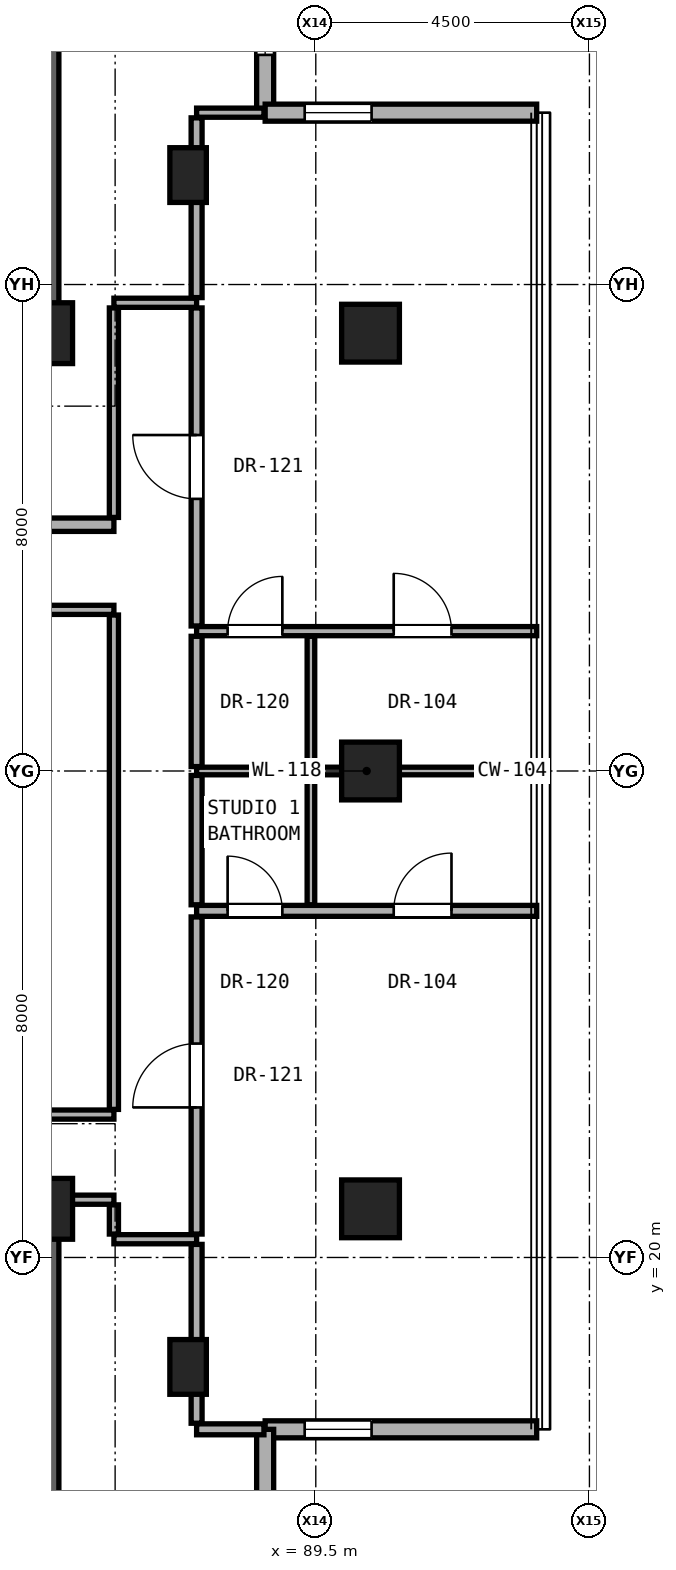
"""IFC4 building model, lengths in metres.
Left out: names, types, materials, properties, quantities, classifications, styles, units other than length and angle.
Written with IfcOpenShell. Run it as: python <this file> out.ifc"""

import sys

from ifc_helpers import new_model, si_unit, direction, frame, frame_2d, origin, origin_2d, place, context, subcontext, project, spatial, rectangle, hollow_rectangle, extrude, element, fill, save


model = new_model("IFC4")
c1 = context("Model", 3, precision=1e-05, world=origin(), true_north=direction((0.0, 1.0)))
c2 = subcontext(c1, "Body", "Model", "MODEL_VIEW")
j1 = project(units=[si_unit("LENGTHUNIT", "METRE"), si_unit("PLANEANGLEUNIT", "RADIAN")], contexts=[c1])
p1 = place(None, origin())
s1 = spatial("IfcSite", under=j1, at=p1, CompositionType="ELEMENT")
p2 = place(p1, origin())
s2 = spatial("IfcBuilding", under=s1, at=p2, CompositionType="ELEMENT")
p3 = place(p2, frame((0.0, 0.0, 154.4)))
s3 = spatial("IfcBuildingStorey", under=s2, at=p3, CompositionType="ELEMENT", Elevation=154.4)
for number, where, z_axis, x_axis in (
    (1, (85.0, 20.8, 0.0), (0.0, 0.0, 1.0), (1.0, 0.0, 0.0)),
    (2, (85.0, 35.2, 0.0), (0.0, 0.0, 1.0), (1.0, 0.0, 0.0)),
):
    element("IfcColumn", number, at=place(p3, frame(where, z_axis=z_axis, x_axis=x_axis)), inside=s3, PredefinedType="COLUMN", context=c2, shape_type="SweptSolid", body=[
        extrude(rectangle(XDim=1.0, YDim=1.0, at=origin_2d()), origin(), (0.0, 0.0, 1.0), 3.25),
    ])
for number, where, z_axis, x_axis in (
    (3, (90.4, 20.8, 0.0), (0.0, 0.0, 1.0), (1.0, 0.0, 0.0)),
    (4, (90.4, 28.0, 0.0), (0.0, 0.0, 1.0), (1.0, 0.0, 0.0)),
    (5, (90.4, 35.2, 0.0), (0.0, 0.0, 1.0), (1.0, 0.0, 0.0)),
):
    element("IfcColumn", number, at=place(p3, frame(where, z_axis=z_axis, x_axis=x_axis)), inside=s3, PredefinedType="COLUMN", context=c2, shape_type="SweptSolid", body=[
        extrude(hollow_rectangle(XDim=0.95, YDim=0.95, WallThickness=0.05, at=origin_2d()), origin(), (0.0, 0.0, 1.0), 3.25),
    ])
for number, where, z_axis, x_axis in (
    (6, (87.4, 18.2, 0.0), (0.0, 0.0, 1.0), (1.0, 0.0, 0.0)),
    (7, (87.4, 37.8, 0.0), (0.0, 0.0, 1.0), (1.0, 0.0, 0.0)),
):
    element("IfcColumn", number, at=place(p3, frame(where, z_axis=z_axis, x_axis=x_axis)), inside=s3, PredefinedType="PILASTER", context=c2, shape_type="SweptSolid", body=[
        extrude(rectangle(XDim=0.6, YDim=0.9, at=origin_2d()), origin(), (0.0, 0.0, 1.0), 3.25),
    ])
for number, where, z_axis, x_axis in (
    (8, (85.0, 35.2, 0.0), (0.0, 0.0, 1.0), (0.0, 1.0, 0.0)),
    (9, (85.0, 15.2, 0.0), (0.0, 0.0, 1.0), (0.0, 1.0, 0.0)),
):
    element("IfcWall", number, at=place(p3, frame(where, z_axis=z_axis, x_axis=x_axis)), inside=s3, PredefinedType="SHEAR", context=c2, shape_type="SweptSolid", body=[
        extrude(rectangle(XDim=5.6, YDim=0.55, at=frame_2d((2.8, 0.0))), origin(), (0.0, 0.0, 1.0), 3.05),
    ])
p4 = place(p3, frame((88.667, 38.826, 0.0), z_axis=(0.0, 0.0, 1.0), x_axis=(0.0, 1.0, 0.0)))
e10 = element("IfcWall", 10, at=p4, inside=s3, PredefinedType="SOLIDWALL", context=c2, shape_type="SweptSolid", body=[
    extrude(rectangle(XDim=4.465, YDim=0.28, at=frame_2d((2.232, 0.0))), origin(), (0.0, 0.0, 1.0), 3.03),
])
p5 = place(p4, frame((0.95, 0.0, 0.85)))
e11 = element("IfcOpeningElement", 11, at=p5, cuts=e10, PredefinedType="OPENING", context=c2, shape_type="SweptSolid", body=[
    extrude(rectangle(XDim=1.1, YDim=2.0, at=frame_2d((0.55, 1.0))), frame((0.0, 0.15, 0.0), z_axis=(0.0, -1.0, 0.0), x_axis=(1.0, 0.0, 0.0)), (0.0, 0.0, 1.0), 0.3),
])
p6 = place(p3, frame((88.667, 17.174, 0.0), z_axis=(0.0, 0.0, 1.0), x_axis=(1.0, 0.0, 0.0)))
e12 = element("IfcWall", 12, at=p6, inside=s3, PredefinedType="SOLIDWALL", context=c2, shape_type="SweptSolid", body=[
    extrude(rectangle(XDim=4.465, YDim=0.28, at=frame_2d((2.233, 0.0))), origin(), (0.0, 0.0, 1.0), 3.03),
])
p7 = place(p6, frame((0.65, 0.0, 0.85)))
e13 = element("IfcOpeningElement", 13, at=p7, cuts=e12, PredefinedType="OPENING", context=c2, shape_type="SweptSolid", body=[
    extrude(rectangle(XDim=1.1, YDim=2.0, at=frame_2d((0.55, 1.0))), frame((0.0, 0.15, 0.0), z_axis=(0.0, -1.0, 0.0), x_axis=(1.0, 0.0, 0.0)), (0.0, 0.0, 1.0), 0.3),
])
p8 = place(p3, frame((88.667, 12.708, 0.0), z_axis=(0.0, 0.0, 1.0), x_axis=(0.0, 1.0, 0.0)))
e14 = element("IfcWall", 14, at=p8, inside=s3, PredefinedType="SOLIDWALL", context=c2, shape_type="SweptSolid", body=[
    extrude(rectangle(XDim=4.465, YDim=0.28, at=frame_2d((2.232, 0.0))), origin(), (0.0, 0.0, 1.0), 3.03),
])
p9 = place(p3, frame((93.133, 38.826, 0.0), z_axis=(0.0, 0.0, 1.0), x_axis=(-1.0, 0.0, 0.0)))
e15 = element("IfcWall", 15, at=p9, inside=s3, PredefinedType="SOLIDWALL", context=c2, shape_type="SweptSolid", body=[
    extrude(rectangle(XDim=4.465, YDim=0.28, at=frame_2d((2.233, 0.0))), origin(), (0.0, 0.0, 1.0), 3.03),
])
p10 = place(p9, frame((2.715, 0.0, 0.85)))
e16 = element("IfcOpeningElement", 16, at=p10, cuts=e15, PredefinedType="OPENING", context=c2, shape_type="SweptSolid", body=[
    extrude(rectangle(XDim=1.1, YDim=2.0, at=frame_2d((0.55, 1.0))), frame((0.0, 0.15, 0.0), z_axis=(0.0, -1.0, 0.0), x_axis=(1.0, 0.0, 0.0)), (0.0, 0.0, 1.0), 0.3),
])
p11 = place(p3, frame((87.54, 17.174, 0.0), z_axis=(0.0, 0.0, 1.0), x_axis=(1.0, 0.0, 0.0)))
e17 = element("IfcWall", 17, at=p11, inside=s3, PredefinedType="PARTITIONING", context=c2, shape_type="SweptSolid", body=[
    extrude(rectangle(XDim=1.107, YDim=0.18, at=frame_2d((0.554, 0.0))), origin(), (0.0, 0.0, 1.0), 3.05),
])
p12 = place(p3, frame((86.18, 20.3, 0.0), z_axis=(0.0, 0.0, 1.0), x_axis=(1.0, 0.0, 0.0)))
e18 = element("IfcWall", 18, at=p12, inside=s3, PredefinedType="PARTITIONING", context=c2, shape_type="SweptSolid", body=[
    extrude(rectangle(XDim=1.36, YDim=0.15, at=frame_2d((0.68, 0.0))), origin(), (0.0, 0.0, 1.0), 3.05),
])
p13 = place(p3, frame((85.27, 20.95, 0.0), z_axis=(0.0, 0.0, 1.0), x_axis=(1.0, 0.0, 0.0)))
e19 = element("IfcWall", 19, at=p13, inside=s3, PredefinedType="PARTITIONING", context=c2, shape_type="SweptSolid", body=[
    extrude(rectangle(XDim=0.91, YDim=0.15, at=frame_2d((0.455, 0.0))), origin(), (0.0, 0.0, 1.0), 2.442),
])
p14 = place(p3, frame((66.68, 22.35, 0.0), z_axis=(0.0, 0.0, 1.0), x_axis=(1.0, 0.0, 0.0)))
e20 = element("IfcWall", 20, at=p14, inside=s3, PredefinedType="PARTITIONING", context=c2, shape_type="SweptSolid", body=[
    extrude(rectangle(XDim=19.5, YDim=0.15, at=frame_2d((9.75, 0.0))), origin(), (0.0, 0.0, 1.0), 2.186),
])
p15 = place(p14, frame((8.053, 0.0, 0.0)))
e21 = element("IfcOpeningElement", 21, at=p15, cuts=e20, PredefinedType="OPENING", context=c2, shape_type="SweptSolid", body=[
    extrude(rectangle(XDim=0.85, YDim=2.01, at=frame_2d((0.425, 1.005))), frame((0.0, 0.085, 0.0), z_axis=(0.0, -1.0, 0.0), x_axis=(1.0, 0.0, 0.0)), (0.0, 0.0, 1.0), 0.17),
])
p16 = place(p3, frame((87.54, 25.7, 0.0), z_axis=(0.0, 0.0, 1.0), x_axis=(1.0, 0.0, 0.0)))
e22 = element("IfcWall", 22, at=p16, inside=s3, PredefinedType="PARTITIONING", context=c2, shape_type="SweptSolid", body=[
    extrude(rectangle(XDim=5.593, YDim=0.18, at=frame_2d((2.796, 0.0))), origin(), (0.0, 0.0, 1.0), 2.269),
])
p17 = place(p16, frame((3.241, 0.0, 0.0)))
e23 = element("IfcOpeningElement", 23, at=p17, cuts=e22, PredefinedType="OPENING", context=c2, shape_type="SweptSolid", body=[
    extrude(rectangle(XDim=0.95, YDim=2.15, at=frame_2d((0.475, 1.075))), frame((0.0, 0.1, 0.0), z_axis=(0.0, -1.0, 0.0), x_axis=(1.0, 0.0, 0.0)), (0.0, 0.0, 1.0), 0.2),
])
p18 = place(p16, frame((0.51, 0.0, 0.0)))
e24 = element("IfcOpeningElement", 24, at=p18, cuts=e22, PredefinedType="OPENING", context=c2, shape_type="SweptSolid", body=[
    extrude(rectangle(XDim=0.9, YDim=2.1, at=frame_2d((0.45, 1.05))), frame((0.0, 0.1, 0.0), z_axis=(0.0, -1.0, 0.0), x_axis=(1.0, 0.0, 0.0)), (0.0, 0.0, 1.0), 0.2),
])
p19 = place(p3, frame((87.54, 28.0, 0.0), z_axis=(0.0, 0.0, 1.0), x_axis=(1.0, 0.0, 0.0)))
e25 = element("IfcWall", 25, at=p19, inside=s3, PredefinedType="PARTITIONING", context=c2, shape_type="SweptSolid", body=[
    extrude(rectangle(XDim=5.593, YDim=0.125, at=frame_2d((2.796, 0.0))), origin(), (0.0, 0.0, 1.0), 2.269),
])
p20 = place(p3, frame((87.54, 30.3, 0.0), z_axis=(0.0, 0.0, 1.0), x_axis=(1.0, 0.0, 0.0)))
e26 = element("IfcWall", 26, at=p20, inside=s3, PredefinedType="PARTITIONING", context=c2, shape_type="SweptSolid", body=[
    extrude(rectangle(XDim=5.593, YDim=0.15, at=frame_2d((2.796, 0.0))), origin(), (0.0, 0.0, 1.0), 2.269),
])
p21 = place(p20, frame((3.241, 0.0, 0.0)))
e27 = element("IfcOpeningElement", 27, at=p21, cuts=e26, PredefinedType="OPENING", context=c2, shape_type="SweptSolid", body=[
    extrude(rectangle(XDim=0.95, YDim=2.15, at=frame_2d((0.475, 1.075))), frame((0.0, 0.085, 0.0), z_axis=(0.0, -1.0, 0.0), x_axis=(1.0, 0.0, 0.0)), (0.0, 0.0, 1.0), 0.17),
])
p22 = place(p20, frame((0.51, 0.0, 0.0)))
e28 = element("IfcOpeningElement", 28, at=p22, cuts=e26, PredefinedType="OPENING", context=c2, shape_type="SweptSolid", body=[
    extrude(rectangle(XDim=0.9, YDim=2.1, at=frame_2d((0.45, 1.05))), frame((0.0, 0.085, 0.0), z_axis=(0.0, -1.0, 0.0), x_axis=(1.0, 0.0, 0.0)), (0.0, 0.0, 1.0), 0.17),
])
p23 = place(p3, frame((66.68, 30.65, 0.0), z_axis=(0.0, 0.0, 1.0), x_axis=(1.0, 0.0, 0.0)))
e29 = element("IfcWall", 29, at=p23, inside=s3, PredefinedType="PARTITIONING", context=c2, shape_type="SweptSolid", body=[
    extrude(rectangle(XDim=19.5, YDim=0.15, at=frame_2d((9.75, 0.0))), origin(), (0.0, 0.0, 1.0), 2.186),
])
p24 = place(p23, frame((3.745, 0.0, 0.0)))
e30 = element("IfcOpeningElement", 30, at=p24, cuts=e29, PredefinedType="OPENING", context=c2, shape_type="SweptSolid", body=[
    extrude(rectangle(XDim=0.95, YDim=2.15, at=frame_2d((0.475, 1.075))), frame((0.0, 0.085, 0.0), z_axis=(0.0, -1.0, 0.0), x_axis=(1.0, 0.0, 0.0)), (0.0, 0.0, 1.0), 0.17),
])
p25 = place(p23, frame((15.098, 0.0, 0.0)))
e31 = element("IfcOpeningElement", 31, at=p25, cuts=e29, PredefinedType="OPENING", context=c2, shape_type="SweptSolid", body=[
    extrude(rectangle(XDim=0.85, YDim=2.01, at=frame_2d((0.425, 1.005))), frame((0.0, 0.085, 0.0), z_axis=(0.0, -1.0, 0.0), x_axis=(1.0, 0.0, 0.0)), (0.0, 0.0, 1.0), 0.17),
])
p26 = place(p3, frame((71.55, 32.05, 0.0), z_axis=(0.0, 0.0, 1.0), x_axis=(1.0, 0.0, 0.0)))
e32 = element("IfcWall", 32, at=p26, inside=s3, PredefinedType="SOLIDWALL", context=c2, shape_type="SweptSolid", body=[
    extrude(rectangle(XDim=14.63, YDim=0.22, at=frame_2d((7.315, 0.0))), origin(), (0.0, 0.0, 1.0), 2.186),
])
p27 = place(p26, frame((6.065, 0.0, 0.0)))
e33 = element("IfcOpeningElement", 33, at=p27, cuts=e32, PredefinedType="OPENING", context=c2, shape_type="SweptSolid", body=[
    extrude(rectangle(XDim=0.85, YDim=2.01, at=frame_2d((0.425, 1.005))), frame((0.0, 0.12, 0.0), z_axis=(0.0, -1.0, 0.0), x_axis=(1.0, 0.0, 0.0)), (0.0, 0.0, 1.0), 0.24),
])
p28 = place(p26, frame((10.535, 0.0, 0.0)))
e34 = element("IfcOpeningElement", 34, at=p28, cuts=e32, PredefinedType="OPENING", context=c2, shape_type="SweptSolid", body=[
    extrude(rectangle(XDim=0.95, YDim=2.15, at=frame_2d((0.475, 1.075))), frame((0.0, 0.12, 0.0), z_axis=(0.0, -1.0, 0.0), x_axis=(1.0, 0.0, 0.0)), (0.0, 0.0, 1.0), 0.24),
])
p29 = place(p26, frame((1.65, 0.0, 0.0)))
e35 = element("IfcOpeningElement", 35, at=p29, cuts=e32, PredefinedType="OPENING", context=c2, shape_type="SweptSolid", body=[
    extrude(rectangle(XDim=0.85, YDim=2.01, at=frame_2d((0.425, 1.005))), frame((0.0, 0.12, 0.0), z_axis=(0.0, -1.0, 0.0), x_axis=(1.0, 0.0, 0.0)), (0.0, 0.0, 1.0), 0.24),
])
p30 = place(p3, frame((86.18, 35.7, 0.0), z_axis=(0.0, 0.0, 1.0), x_axis=(1.0, 0.0, 0.0)))
e36 = element("IfcWall", 36, at=p30, inside=s3, PredefinedType="PARTITIONING", context=c2, shape_type="SweptSolid", body=[
    extrude(rectangle(XDim=1.36, YDim=0.15, at=frame_2d((0.68, 0.0))), origin(), (0.0, 0.0, 1.0), 3.05),
])
p31 = place(p3, frame((87.54, 38.826, 0.0), z_axis=(0.0, 0.0, 1.0), x_axis=(1.0, 0.0, 0.0)))
e37 = element("IfcWall", 37, at=p31, inside=s3, PredefinedType="PARTITIONING", context=c2, shape_type="SweptSolid", body=[
    extrude(rectangle(XDim=1.107, YDim=0.15, at=frame_2d((0.554, 0.0))), origin(), (0.0, 0.0, 1.0), 3.05),
])
p32 = place(p3, frame((86.18, 20.385, 0.0), z_axis=(0.0, 0.0, 1.0), x_axis=(0.0, 1.0, 0.0)))
e38 = element("IfcWall", 38, at=p32, inside=s3, PredefinedType="PARTITIONING", context=c2, shape_type="SweptSolid", body=[
    extrude(rectangle(XDim=0.48, YDim=0.15, at=frame_2d((0.24, 0.0))), origin(), (0.0, 0.0, 1.0), 2.442),
])
p33 = place(p3, frame((86.18, 22.435, 0.0), z_axis=(0.0, 0.0, 1.0), x_axis=(0.0, 1.0, 0.0)))
e39 = element("IfcWall", 39, at=p33, inside=s3, PredefinedType="PARTITIONING", context=c2, shape_type="SweptSolid", body=[
    extrude(rectangle(XDim=8.13, YDim=0.15, at=frame_2d((4.065, 0.0))), origin(), (0.0, 0.0, 1.0), 2.346),
])
p34 = place(p3, frame((86.18, 32.17, 0.0), z_axis=(0.0, 0.0, 1.0), x_axis=(0.0, 1.0, 0.0)))
e40 = element("IfcWall", 40, at=p34, inside=s3, PredefinedType="PARTITIONING", context=c2, shape_type="SweptSolid", body=[
    extrude(rectangle(XDim=3.445, YDim=0.15, at=frame_2d((1.723, 0.0))), origin(), (0.0, 0.0, 1.0), 2.442),
])
p35 = place(p3, frame((87.54, 17.274, 0.0), z_axis=(0.0, 0.0, 1.0), x_axis=(0.0, 1.0, 0.0)))
e41 = element("IfcWall", 41, at=p35, inside=s3, PredefinedType="PARTITIONING", context=c2, shape_type="SweptSolid", body=[
    extrude(rectangle(XDim=2.941, YDim=0.18, at=frame_2d((1.471, 0.0))), origin(), (0.0, 0.0, 1.0), 2.493),
])
p36 = place(p3, frame((87.54, 20.385, 0.0), z_axis=(0.0, 0.0, 1.0), x_axis=(0.0, 1.0, 0.0)))
e42 = element("IfcWall", 42, at=p36, inside=s3, PredefinedType="PARTITIONING", context=c2, shape_type="SweptSolid", body=[
    extrude(rectangle(XDim=5.215, YDim=0.18, at=frame_2d((2.607, 0.0))), origin(), (0.0, 0.0, 1.0), 2.442),
])
p37 = place(p36, frame((2.083, 0.0, 0.0)))
e43 = element("IfcOpeningElement", 43, at=p37, cuts=e42, PredefinedType="OPENING", context=c2, shape_type="SweptSolid", body=[
    extrude(rectangle(XDim=1.05, YDim=2.2, at=frame_2d((0.525, 1.1))), frame((0.0, 0.1, 0.0), z_axis=(0.0, -1.0, 0.0), x_axis=(1.0, 0.0, 0.0)), (0.0, 0.0, 1.0), 0.2),
])
p38 = place(p3, frame((87.54, 25.8, 0.0), z_axis=(0.0, 0.0, 1.0), x_axis=(0.0, 1.0, 0.0)))
e44 = element("IfcWall", 44, at=p38, inside=s3, PredefinedType="PARTITIONING", context=c2, shape_type="SweptSolid", body=[
    extrude(rectangle(XDim=2.127, YDim=0.18, at=frame_2d((1.064, 0.0))), origin(), (0.0, 0.0, 1.0), 2.346),
])
p39 = place(p3, frame((87.54, 28.073, 0.0), z_axis=(0.0, 0.0, 1.0), x_axis=(0.0, 1.0, 0.0)))
e45 = element("IfcWall", 45, at=p39, inside=s3, PredefinedType="PARTITIONING", context=c2, shape_type="SweptSolid", body=[
    extrude(rectangle(XDim=2.143, YDim=0.18, at=frame_2d((1.071, 0.0))), origin(), (0.0, 0.0, 1.0), 2.346),
])
p40 = place(p3, frame((87.54, 30.385, 0.0), z_axis=(0.0, 0.0, 1.0), x_axis=(0.0, 1.0, 0.0)))
e46 = element("IfcWall", 46, at=p40, inside=s3, PredefinedType="PARTITIONING", context=c2, shape_type="SweptSolid", body=[
    extrude(rectangle(XDim=5.23, YDim=0.18, at=frame_2d((2.615, 0.0))), origin(), (0.0, 0.0, 1.0), 2.442),
])
p41 = place(p40, frame((2.09, 0.0, 0.0)))
e47 = element("IfcOpeningElement", 47, at=p41, cuts=e46, PredefinedType="OPENING", context=c2, shape_type="SweptSolid", body=[
    extrude(rectangle(XDim=1.05, YDim=2.2, at=frame_2d((0.525, 1.1))), frame((0.0, 0.1, 0.0), z_axis=(0.0, -1.0, 0.0), x_axis=(1.0, 0.0, 0.0)), (0.0, 0.0, 1.0), 0.2),
])
p42 = place(p3, frame((87.54, 35.785, 0.0), z_axis=(0.0, 0.0, 1.0), x_axis=(0.0, 1.0, 0.0)))
e48 = element("IfcWall", 48, at=p42, inside=s3, PredefinedType="PARTITIONING", context=c2, shape_type="SweptSolid", body=[
    extrude(rectangle(XDim=2.956, YDim=0.18, at=frame_2d((1.478, 0.0))), origin(), (0.0, 0.0, 1.0), 2.493),
])
p43 = place(p3, frame((89.42, 25.8, 0.0), z_axis=(0.0, 0.0, 1.0), x_axis=(0.0, 1.0, 0.0)))
e49 = element("IfcWall", 49, at=p43, inside=s3, PredefinedType="PARTITIONING", context=c2, shape_type="SweptSolid", body=[
    extrude(rectangle(XDim=2.127, YDim=0.125, at=frame_2d((1.064, 0.0))), origin(), (0.0, 0.0, 1.0), 2.346),
])
p44 = place(p3, frame((89.42, 28.073, 0.0), z_axis=(0.0, 0.0, 1.0), x_axis=(0.0, 1.0, 0.0)))
e50 = element("IfcWall", 50, at=p44, inside=s3, PredefinedType="PARTITIONING", context=c2, shape_type="SweptSolid", body=[
    extrude(rectangle(XDim=2.143, YDim=0.125, at=frame_2d((1.071, 0.0))), origin(), (0.0, 0.0, 1.0), 2.346),
])
p45 = place(p5, origin())
e51 = element("IfcWindow", 51, at=p45, inside=s3, PartitioningType="SINGLE_PANEL", PredefinedType="WINDOW", context=c2, shape_type="SweptSolid", body=[
    extrude(rectangle(XDim=1.1, YDim=2.0, at=frame_2d((0.55, 1.0))), frame((0.0, 0.03, 0.0), z_axis=(0.0, -1.0, 0.0), x_axis=(1.0, 0.0, 0.0)), (0.0, 0.0, 1.0), 0.06),
])
fill(e11, e51)
p46 = place(p7, origin())
e52 = element("IfcWindow", 52, at=p46, inside=s3, PartitioningType="SINGLE_PANEL", PredefinedType="WINDOW", context=c2, shape_type="SweptSolid", body=[
    extrude(rectangle(XDim=1.1, YDim=2.0, at=frame_2d((0.55, 1.0))), frame((0.0, 0.03, 0.0), z_axis=(0.0, -1.0, 0.0), x_axis=(1.0, 0.0, 0.0)), (0.0, 0.0, 1.0), 0.06),
])
fill(e13, e52)
p47 = place(p10, origin())
e53 = element("IfcWindow", 53, at=p47, inside=s3, PartitioningType="SINGLE_PANEL", PredefinedType="WINDOW", context=c2, shape_type="SweptSolid", body=[
    extrude(rectangle(XDim=1.1, YDim=2.0, at=frame_2d((0.55, 1.0))), frame((0.0, 0.03, 0.0), z_axis=(0.0, -1.0, 0.0), x_axis=(1.0, 0.0, 0.0)), (0.0, 0.0, 1.0), 0.06),
])
fill(e16, e53)
p48 = place(p37, origin())
e54 = element("IfcDoor", 54, at=p48, inside=s3, OperationType="SINGLE_SWING_LEFT", PredefinedType="DOOR", context=c2, shape_type="SweptSolid", body=[
    extrude(rectangle(XDim=1.05, YDim=2.2, at=frame_2d((0.525, 1.1))), frame((0.0, 0.025, 0.0), z_axis=(0.0, -1.0, 0.0), x_axis=(1.0, 0.0, 0.0)), (0.0, 0.0, 1.0), 0.05),
])
fill(e43, e54)
p49 = place(p17, origin())
e55 = element("IfcDoor", 55, at=p49, inside=s3, OperationType="SINGLE_SWING_RIGHT", PredefinedType="DOOR", context=c2, shape_type="SweptSolid", body=[
    extrude(rectangle(XDim=0.95, YDim=2.15, at=frame_2d((0.475, 1.075))), frame((0.0, 0.025, 0.0), z_axis=(0.0, -1.0, 0.0), x_axis=(1.0, 0.0, 0.0)), (0.0, 0.0, 1.0), 0.05),
])
fill(e23, e55)
p50 = place(p18, origin())
e56 = element("IfcDoor", 56, at=p50, inside=s3, OperationType="SINGLE_SWING_LEFT", PredefinedType="DOOR", context=c2, shape_type="SweptSolid", body=[
    extrude(rectangle(XDim=0.9, YDim=2.1, at=frame_2d((0.45, 1.05))), frame((0.0, 0.025, 0.0), z_axis=(0.0, -1.0, 0.0), x_axis=(1.0, 0.0, 0.0)), (0.0, 0.0, 1.0), 0.05),
])
fill(e24, e56)
p51 = place(p41, origin())
e57 = element("IfcDoor", 57, at=p51, inside=s3, OperationType="SINGLE_SWING_RIGHT", PredefinedType="DOOR", context=c2, shape_type="SweptSolid", body=[
    extrude(rectangle(XDim=1.05, YDim=2.2, at=frame_2d((0.525, 1.1))), frame((0.0, 0.025, 0.0), z_axis=(0.0, -1.0, 0.0), x_axis=(1.0, 0.0, 0.0)), (0.0, 0.0, 1.0), 0.05),
])
fill(e47, e57)
p52 = place(p21, origin())
e58 = element("IfcDoor", 58, at=p52, inside=s3, OperationType="SINGLE_SWING_LEFT", PredefinedType="DOOR", context=c2, shape_type="SweptSolid", body=[
    extrude(rectangle(XDim=0.95, YDim=2.15, at=frame_2d((0.475, 1.075))), frame((0.0, 0.025, 0.0), z_axis=(0.0, -1.0, 0.0), x_axis=(1.0, 0.0, 0.0)), (0.0, 0.0, 1.0), 0.05),
])
fill(e27, e58)
p53 = place(p22, origin())
e59 = element("IfcDoor", 59, at=p53, inside=s3, OperationType="SINGLE_SWING_RIGHT", PredefinedType="DOOR", context=c2, shape_type="SweptSolid", body=[
    extrude(rectangle(XDim=0.9, YDim=2.1, at=frame_2d((0.45, 1.05))), frame((0.0, 0.025, 0.0), z_axis=(0.0, -1.0, 0.0), x_axis=(1.0, 0.0, 0.0)), (0.0, 0.0, 1.0), 0.05),
])
fill(e28, e59)
save(model, sys.argv[1])
